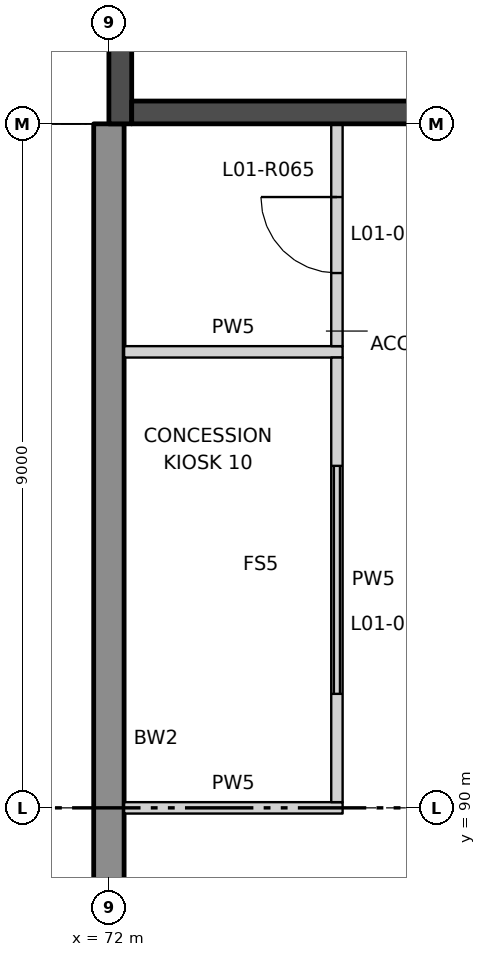
"""IFC4 building model, lengths in metres.
Left out: names, types, materials, properties, quantities, classifications, styles, units other than length and angle.
Written with IfcOpenShell. Run it as: python <this file> out.ifc"""

import sys

from ifc_helpers import new_model, si_unit, direction, frame, frame_2d, origin, place, context, subcontext, project, spatial, rectangle, extrude, element, fill, save


model = new_model("IFC4")
c1 = context("Model", 3, precision=1e-05, world=origin(), true_north=direction((0.0, 1.0)))
c2 = subcontext(c1, "Body", "Model", "MODEL_VIEW")
j1 = project(units=[si_unit("LENGTHUNIT", "METRE"), si_unit("PLANEANGLEUNIT", "RADIAN")], contexts=[c1])
p1 = place(None, origin())
s1 = spatial("IfcSite", under=j1, at=p1, CompositionType="ELEMENT")
p2 = place(p1, origin())
s2 = spatial("IfcBuilding", under=s1, at=p2, CompositionType="ELEMENT")
p3 = place(p2, frame((0.0, 0.0, 7.0)))
s3 = spatial("IfcBuildingStorey", under=s2, at=p3, CompositionType="ELEMENT", Elevation=7.0)
p4 = place(p3, frame((72.0, 99.0, 0.0), z_axis=(0.0, 0.0, 1.0), x_axis=(0.0, -1.0, 0.0)))
e1 = element("IfcWall", 1, at=p4, inside=s3, PredefinedType="SOLIDWALL", context=c2, shape_type="SweptSolid", body=[
    extrude(rectangle(XDim=16.2, YDim=0.4, at=frame_2d((8.1, 0.0))), origin(), (0.0, 0.0, 1.0), 4.5),
])
p5 = place(p3, frame((72.2, 90.0, 0.0), z_axis=(0.0, 0.0, 1.0), x_axis=(1.0, 0.0, 0.0)))
e2 = element("IfcWall", 2, at=p5, inside=s3, PredefinedType="PARTITIONING", context=c2, shape_type="SweptSolid", body=[
    extrude(rectangle(XDim=2.875, YDim=0.15, at=frame_2d((1.438, 0.0))), origin(), (0.0, 0.0, 1.0), 3.25),
])
p6 = place(p3, frame((72.2, 96.0, 0.0), z_axis=(0.0, 0.0, 1.0), x_axis=(1.0, 0.0, 0.0)))
e3 = element("IfcWall", 3, at=p6, inside=s3, PredefinedType="PARTITIONING", context=c2, shape_type="SweptSolid", body=[
    extrude(rectangle(XDim=2.875, YDim=0.15, at=frame_2d((1.438, 0.0))), origin(), (0.0, 0.0, 1.0), 4.5),
])
p7 = place(p3, frame((75.0, 90.075, 0.0), z_axis=(0.0, 0.0, 1.0), x_axis=(0.0, 1.0, 0.0)))
e4 = element("IfcWall", 4, at=p7, inside=s3, PredefinedType="PARTITIONING", context=c2, shape_type="SweptSolid", body=[
    extrude(rectangle(XDim=5.85, YDim=0.15, at=frame_2d((2.925, 0.0))), origin(), (0.0, 0.0, 1.0), 4.5),
])
p8 = place(p7, frame((1.425, 0.0, 0.0)))
e5 = element("IfcOpeningElement", 5, at=p8, cuts=e4, PredefinedType="OPENING", context=c2, shape_type="SweptSolid", body=[
    extrude(rectangle(XDim=3.0, YDim=2.4, at=frame_2d((1.5, 1.2))), frame((0.0, 0.085, 0.0), z_axis=(0.0, -1.0, 0.0), x_axis=(1.0, 0.0, 0.0)), (0.0, 0.0, 1.0), 0.17),
])
p9 = place(p3, frame((75.0, 96.075, 0.0), z_axis=(0.0, 0.0, 1.0), x_axis=(0.0, 1.0, 0.0)))
e6 = element("IfcWall", 6, at=p9, inside=s3, PredefinedType="PARTITIONING", context=c2, shape_type="SweptSolid", body=[
    extrude(rectangle(XDim=2.925, YDim=0.15, at=frame_2d((1.462, 0.0))), origin(), (0.0, 0.0, 1.0), 4.5),
])
p10 = place(p9, frame((0.962, 0.0, 0.0)))
e7 = element("IfcOpeningElement", 7, at=p10, cuts=e6, PredefinedType="OPENING", context=c2, shape_type="SweptSolid", body=[
    extrude(rectangle(XDim=1.0, YDim=2.1, at=frame_2d((0.5, 1.05))), frame((0.0, 0.085, 0.0), z_axis=(0.0, -1.0, 0.0), x_axis=(1.0, 0.0, 0.0)), (0.0, 0.0, 1.0), 0.17),
])
p11 = place(p3, frame((72.15, 99.0, 0.0), z_axis=(0.0, 0.0, 1.0), x_axis=(0.0, 1.0, 0.0)))
e8 = element("IfcWall", 8, at=p11, inside=s3, PredefinedType="SHEAR", context=c2, shape_type="SweptSolid", body=[
    extrude(rectangle(XDim=18.0, YDim=0.3, at=frame_2d((9.0, 0.0))), origin(), (0.0, 0.0, 1.0), 4.5),
])
p12 = place(p3, frame((80.7, 99.15, 0.0), z_axis=(0.0, 0.0, 1.0), x_axis=(-1.0, 0.0, 0.0)))
e9 = element("IfcWall", 9, at=p12, inside=s3, PredefinedType="SHEAR", context=c2, shape_type="SweptSolid", body=[
    extrude(rectangle(XDim=8.4, YDim=0.3, at=frame_2d((4.2, 0.0))), origin(), (0.0, 0.0, 1.0), 4.5),
])
p13 = place(p8, origin())
e10 = element("IfcDoor", 10, at=p13, inside=s3, OperationType="ROLLINGUP", PredefinedType="DOOR", context=c2, shape_type="SweptSolid", body=[
    extrude(rectangle(XDim=3.0, YDim=2.4, at=frame_2d((1.5, 1.2))), frame((0.0, 0.025, 0.0), z_axis=(0.0, -1.0, 0.0), x_axis=(1.0, 0.0, 0.0)), (0.0, 0.0, 1.0), 0.05),
])
fill(e5, e10)
p14 = place(p10, origin())
e11 = element("IfcDoor", 11, at=p14, inside=s3, OperationType="SINGLE_SWING_RIGHT", PredefinedType="DOOR", context=c2, shape_type="SweptSolid", body=[
    extrude(rectangle(XDim=1.0, YDim=2.1, at=frame_2d((0.5, 1.05))), frame((0.0, 0.025, 0.0), z_axis=(0.0, -1.0, 0.0), x_axis=(1.0, 0.0, 0.0)), (0.0, 0.0, 1.0), 0.05),
])
fill(e7, e11)
save(model, sys.argv[1])
